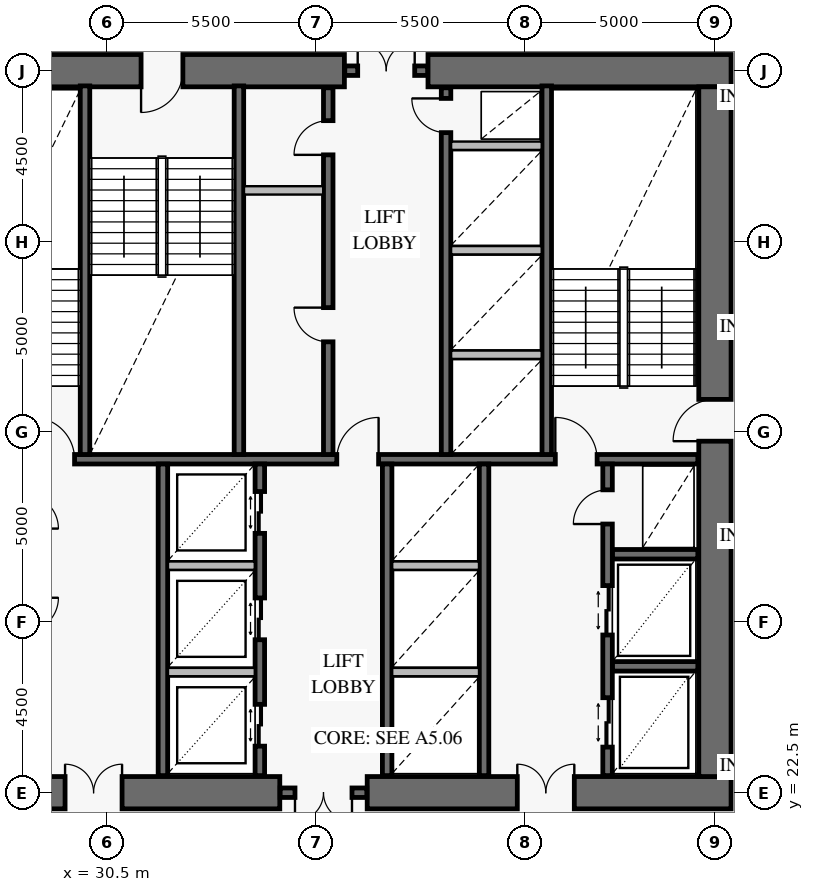
"""IFC4 building model, lengths in metres.
Left out: names, types, materials, properties, quantities, classifications, styles, units other than length and angle.
Written with IfcOpenShell. Run it as: python <this file> out.ifc"""

import sys

from ifc_helpers import new_model, si_unit, direction, frame, frame_2d, origin, place, context, subcontext, project, spatial, rectangle, extrude, element, fill, save


model = new_model("IFC4")
c1 = context("Model", 3, precision=1e-05, world=origin(), true_north=direction((0.0, 1.0)))
c2 = subcontext(c1, "Body", "Model", "MODEL_VIEW")
j1 = project(units=[si_unit("LENGTHUNIT", "METRE"), si_unit("PLANEANGLEUNIT", "RADIAN")], contexts=[c1])
p1 = place(None, origin())
s1 = spatial("IfcSite", under=j1, at=p1, CompositionType="ELEMENT")
p2 = place(p1, origin())
s2 = spatial("IfcBuilding", under=s1, at=p2, CompositionType="ELEMENT")
p3 = place(p2, frame((0.0, 0.0, 75.0)))
s3 = spatial("IfcBuildingStorey", under=s2, at=p3, CompositionType="ELEMENT", Elevation=75.0)
p4 = place(p3, frame((25.075, 22.5, 0.0), z_axis=(0.0, 0.0, 1.0), x_axis=(1.0, 0.0, 0.0)))
e1 = element("IfcWall", 1, at=p4, inside=s3, PredefinedType="SHEAR", context=c2, shape_type="SweptSolid", body=[
    extrude(rectangle(XDim=9.975, YDim=0.85, at=frame_2d((4.988, 0.0))), origin(), (0.0, 0.0, 1.0), 4.2),
])
p5 = place(p4, frame((4.325, 0.0, 0.0)))
e2 = element("IfcOpeningElement", 2, at=p5, cuts=e1, PredefinedType="OPENING", context=c2, shape_type="SweptSolid", body=[
    extrude(rectangle(XDim=1.5, YDim=2.15, at=frame_2d((0.75, 1.075))), frame((0.0, 0.437, 0.0), z_axis=(0.0, -1.0, 0.0), x_axis=(1.0, 0.0, 0.0)), (0.0, 0.0, 1.0), 0.874),
])
p6 = place(p3, frame((37.35, 22.5, 0.0), z_axis=(0.0, 0.0, 1.0), x_axis=(1.0, 0.0, 0.0)))
e3 = element("IfcWall", 3, at=p6, inside=s3, PredefinedType="SHEAR", context=c2, shape_type="SweptSolid", body=[
    extrude(rectangle(XDim=9.575, YDim=0.85, at=frame_2d((4.788, 0.0))), origin(), (0.0, 0.0, 1.0), 4.2),
])
p7 = place(p6, frame((3.95, 0.0, 0.0)))
e4 = element("IfcOpeningElement", 4, at=p7, cuts=e3, PredefinedType="OPENING", context=c2, shape_type="SweptSolid", body=[
    extrude(rectangle(XDim=1.5, YDim=2.15, at=frame_2d((0.75, 1.075))), frame((0.0, 0.437, 0.0), z_axis=(0.0, -1.0, 0.0), x_axis=(1.0, 0.0, 0.0)), (0.0, 0.0, 1.0), 0.874),
])
p8 = place(p3, frame((46.925, 41.5, 0.0), z_axis=(0.0, 0.0, 1.0), x_axis=(-1.0, 0.0, 0.0)))
e5 = element("IfcWall", 5, at=p8, inside=s3, PredefinedType="SHEAR", context=c2, shape_type="SweptSolid", body=[
    extrude(rectangle(XDim=7.975, YDim=0.85, at=frame_2d((3.988, 0.0))), origin(), (0.0, 0.0, 1.0), 4.2),
])
p9 = place(p3, frame((36.75, 41.5, 0.0), z_axis=(0.0, 0.0, 1.0), x_axis=(-1.0, 0.0, 0.0)))
e6 = element("IfcWall", 6, at=p9, inside=s3, PredefinedType="SHEAR", context=c2, shape_type="SweptSolid", body=[
    extrude(rectangle(XDim=11.675, YDim=0.85, at=frame_2d((5.837, 0.0))), origin(), (0.0, 0.0, 1.0), 4.2),
])
p10 = place(p9, frame((4.25, 0.0, 0.0)))
e7 = element("IfcOpeningElement", 7, at=p10, cuts=e6, PredefinedType="OPENING", context=c2, shape_type="SweptSolid", body=[
    extrude(rectangle(XDim=1.1, YDim=2.15, at=frame_2d((0.55, 1.075))), frame((0.0, 0.437, 0.0), z_axis=(0.0, -1.0, 0.0), x_axis=(1.0, 0.0, 0.0)), (0.0, 0.0, 1.0), 0.874),
])
p11 = place(p3, frame((46.5, 22.925, 0.0), z_axis=(0.0, 0.0, 1.0), x_axis=(0.0, 1.0, 0.0)))
e8 = element("IfcWall", 8, at=p11, inside=s3, PredefinedType="SHEAR", context=c2, shape_type="SweptSolid", body=[
    extrude(rectangle(XDim=18.15, YDim=0.85, at=frame_2d((9.075, 0.0))), origin(), (0.0, 0.0, 1.0), 4.2),
])
p12 = place(p11, frame((8.825, 0.0, 0.0)))
e9 = element("IfcOpeningElement", 9, at=p12, cuts=e8, PredefinedType="OPENING", context=c2, shape_type="SweptSolid", body=[
    extrude(rectangle(XDim=1.1, YDim=2.15, at=frame_2d((0.55, 1.075))), frame((0.0, 0.437, 0.0), z_axis=(0.0, -1.0, 0.0), x_axis=(1.0, 0.0, 0.0)), (0.0, 0.0, 1.0), 0.874),
])
p13 = place(p3, frame((35.06, 22.5, 0.0), z_axis=(0.0, 0.0, 1.0), x_axis=(1.0, 0.0, 0.0)))
e10 = element("IfcWall", 10, at=p13, inside=s3, PredefinedType="SOLIDWALL", context=c2, shape_type="SweptSolid", body=[
    extrude(rectangle(XDim=2.28, YDim=0.25, at=frame_2d((1.14, 0.0))), origin(), (0.0, 0.0, 1.0), 4.2),
])
p14 = place(p13, frame((0.39, 0.0, 0.0)))
e11 = element("IfcOpeningElement", 11, at=p14, cuts=e10, PredefinedType="OPENING", context=c2, shape_type="SweptSolid", body=[
    extrude(rectangle(XDim=1.5, YDim=2.15, at=frame_2d((0.75, 1.075))), frame((0.0, 0.137, 0.0), z_axis=(0.0, -1.0, 0.0), x_axis=(1.0, 0.0, 0.0)), (0.0, 0.0, 1.0), 0.274),
])
p15 = place(p3, frame((36.76, 41.5, 0.0), z_axis=(0.0, 0.0, 1.0), x_axis=(1.0, 0.0, 0.0)))
e12 = element("IfcWall", 12, at=p15, inside=s3, PredefinedType="SOLIDWALL", context=c2, shape_type="SweptSolid", body=[
    extrude(rectangle(XDim=2.18, YDim=0.25, at=frame_2d((1.09, 0.0))), origin(), (0.0, 0.0, 1.0), 4.2),
])
p16 = place(p15, frame((0.34, 0.0, 0.0)))
e13 = element("IfcOpeningElement", 13, at=p16, cuts=e12, PredefinedType="OPENING", context=c2, shape_type="SweptSolid", body=[
    extrude(rectangle(XDim=1.5, YDim=2.15, at=frame_2d((0.75, 1.075))), frame((0.0, 0.137, 0.0), z_axis=(0.0, -1.0, 0.0), x_axis=(1.0, 0.0, 0.0)), (0.0, 0.0, 1.0), 0.274),
])
p17 = place(p3, frame((25.95, 31.275, 0.0), z_axis=(0.0, 0.0, 1.0), x_axis=(1.0, 0.0, 0.0)))
e14 = element("IfcWall", 14, at=p17, inside=s3, PredefinedType="SOLIDWALL", context=c2, shape_type="SweptSolid", body=[
    extrude(rectangle(XDim=20.1, YDim=0.25, at=frame_2d((10.05, 0.0))), origin(), (0.0, 0.0, 1.0), 4.2),
])
p18 = place(p17, frame((2.6, 0.0, 0.0)))
e15 = element("IfcOpeningElement", 15, at=p18, cuts=e14, PredefinedType="OPENING", context=c2, shape_type="SweptSolid", body=[
    extrude(rectangle(XDim=1.1, YDim=2.15, at=frame_2d((0.55, 1.075))), frame((0.0, 0.137, 0.0), z_axis=(0.0, -1.0, 0.0), x_axis=(1.0, 0.0, 0.0)), (0.0, 0.0, 1.0), 0.274),
])
p19 = place(p17, frame((10.6, 0.0, 0.0)))
e16 = element("IfcOpeningElement", 16, at=p19, cuts=e14, PredefinedType="OPENING", context=c2, shape_type="SweptSolid", body=[
    extrude(rectangle(XDim=1.1, YDim=2.15, at=frame_2d((0.55, 1.075))), frame((0.0, 0.137, 0.0), z_axis=(0.0, -1.0, 0.0), x_axis=(1.0, 0.0, 0.0)), (0.0, 0.0, 1.0), 0.274),
])
p20 = place(p17, frame((16.35, 0.0, 0.0)))
e17 = element("IfcOpeningElement", 17, at=p20, cuts=e14, PredefinedType="OPENING", context=c2, shape_type="SweptSolid", body=[
    extrude(rectangle(XDim=1.1, YDim=2.15, at=frame_2d((0.55, 1.075))), frame((0.0, 0.137, 0.0), z_axis=(0.0, -1.0, 0.0), x_axis=(1.0, 0.0, 0.0)), (0.0, 0.0, 1.0), 0.274),
])
for number, where, z_axis, x_axis in (
    (18, (29.925, 31.4, 0.0), (0.0, 0.0, 1.0), (0.0, 1.0, 0.0)),
    (19, (33.975, 31.4, 0.0), (0.0, 0.0, 1.0), (0.0, 1.0, 0.0)),
    (20, (42.075, 31.4, 0.0), (0.0, 0.0, 1.0), (0.0, 1.0, 0.0)),
):
    element("IfcWall", number, at=place(p3, frame(where, z_axis=z_axis, x_axis=x_axis)), inside=s3, PredefinedType="SOLIDWALL", context=c2, shape_type="SweptSolid", body=[
        extrude(rectangle(XDim=9.7, YDim=0.25, at=frame_2d((4.85, 0.0))), origin(), (0.0, 0.0, 1.0), 4.2),
    ])
p21 = place(p3, frame((36.325, 31.4, 0.0), z_axis=(0.0, 0.0, 1.0), x_axis=(0.0, 1.0, 0.0)))
e21 = element("IfcWall", 21, at=p21, inside=s3, PredefinedType="SOLIDWALL", context=c2, shape_type="SweptSolid", body=[
    extrude(rectangle(XDim=9.65, YDim=0.25, at=frame_2d((4.825, 0.0))), origin(), (0.0, 0.0, 1.0), 4.2),
])
p22 = place(p21, frame((2.965, 0.0, 0.0)))
e22 = element("IfcOpeningElement", 22, at=p22, cuts=e21, PredefinedType="OPENING", context=c2, shape_type="SweptSolid", body=[
    extrude(rectangle(XDim=0.9, YDim=2.1, at=frame_2d((0.45, 1.05))), frame((0.0, 0.137, 0.0), z_axis=(0.0, -1.0, 0.0), x_axis=(1.0, 0.0, 0.0)), (0.0, 0.0, 1.0), 0.274),
])
p23 = place(p21, frame((7.885, 0.0, 0.0)))
e23 = element("IfcOpeningElement", 23, at=p23, cuts=e21, PredefinedType="OPENING", context=c2, shape_type="SweptSolid", body=[
    extrude(rectangle(XDim=0.9, YDim=2.1, at=frame_2d((0.45, 1.05))), frame((0.0, 0.137, 0.0), z_axis=(0.0, -1.0, 0.0), x_axis=(1.0, 0.0, 0.0)), (0.0, 0.0, 1.0), 0.274),
])
p24 = place(p3, frame((39.425, 31.4, 0.0), z_axis=(0.0, 0.0, 1.0), x_axis=(0.0, 1.0, 0.0)))
e24 = element("IfcWall", 24, at=p24, inside=s3, PredefinedType="SOLIDWALL", context=c2, shape_type="SweptSolid", body=[
    extrude(rectangle(XDim=9.65, YDim=0.25, at=frame_2d((4.825, 0.0))), origin(), (0.0, 0.0, 1.0), 4.2),
])
p25 = place(p24, frame((8.47, 0.0, 0.0)))
e25 = element("IfcOpeningElement", 25, at=p25, cuts=e24, PredefinedType="OPENING", context=c2, shape_type="SweptSolid", body=[
    extrude(rectangle(XDim=0.9, YDim=2.1, at=frame_2d((0.45, 1.05))), frame((0.0, 0.137, 0.0), z_axis=(0.0, -1.0, 0.0), x_axis=(1.0, 0.0, 0.0)), (0.0, 0.0, 1.0), 0.274),
])
p26 = place(p3, frame((31.975, 22.95, 0.0), z_axis=(0.0, 0.0, 1.0), x_axis=(0.0, 1.0, 0.0)))
e26 = element("IfcWall", 26, at=p26, inside=s3, PredefinedType="SOLIDWALL", context=c2, shape_type="SweptSolid", body=[
    extrude(rectangle(XDim=8.2, YDim=0.25, at=frame_2d((4.1, 0.0))), origin(), (0.0, 0.0, 1.0), 4.2),
])
p27 = place(p3, frame((34.525, 22.95, 0.0), z_axis=(0.0, 0.0, 1.0), x_axis=(0.0, 1.0, 0.0)))
e27 = element("IfcWall", 27, at=p27, inside=s3, PredefinedType="SOLIDWALL", context=c2, shape_type="SweptSolid", body=[
    extrude(rectangle(XDim=8.2, YDim=0.25, at=frame_2d((4.1, 0.0))), origin(), (0.0, 0.0, 1.0), 4.2),
])
p28 = place(p27, frame((0.775, 0.0, 0.0)))
e28 = element("IfcOpeningElement", 28, at=p28, cuts=e27, PredefinedType="OPENING", context=c2, shape_type="SweptSolid", body=[
    extrude(rectangle(XDim=1.1, YDim=2.2, at=frame_2d((0.55, 1.1))), frame((0.0, 0.137, 0.0), z_axis=(0.0, -1.0, 0.0), x_axis=(1.0, 0.0, 0.0)), (0.0, 0.0, 1.0), 0.274),
])
p29 = place(p27, frame((3.575, 0.0, 0.0)))
e29 = element("IfcOpeningElement", 29, at=p29, cuts=e27, PredefinedType="OPENING", context=c2, shape_type="SweptSolid", body=[
    extrude(rectangle(XDim=1.1, YDim=2.2, at=frame_2d((0.55, 1.1))), frame((0.0, 0.137, 0.0), z_axis=(0.0, -1.0, 0.0), x_axis=(1.0, 0.0, 0.0)), (0.0, 0.0, 1.0), 0.274),
])
p30 = place(p27, frame((6.375, 0.0, 0.0)))
e30 = element("IfcOpeningElement", 30, at=p30, cuts=e27, PredefinedType="OPENING", context=c2, shape_type="SweptSolid", body=[
    extrude(rectangle(XDim=1.1, YDim=2.2, at=frame_2d((0.55, 1.1))), frame((0.0, 0.137, 0.0), z_axis=(0.0, -1.0, 0.0), x_axis=(1.0, 0.0, 0.0)), (0.0, 0.0, 1.0), 0.274),
])
for number, where, z_axis, x_axis in (
    (31, (37.875, 22.95, 0.0), (0.0, 0.0, 1.0), (0.0, 1.0, 0.0)),
    (32, (40.425, 22.95, 0.0), (0.0, 0.0, 1.0), (0.0, 1.0, 0.0)),
):
    element("IfcWall", number, at=place(p3, frame(where, z_axis=z_axis, x_axis=x_axis)), inside=s3, PredefinedType="SOLIDWALL", context=c2, shape_type="SweptSolid", body=[
        extrude(rectangle(XDim=8.2, YDim=0.25, at=frame_2d((4.1, 0.0))), origin(), (0.0, 0.0, 1.0), 4.2),
    ])
for number, where, z_axis, x_axis in (
    (33, (43.8, 25.825, 0.0), (0.0, 0.0, 1.0), (1.0, 0.0, 0.0)),
    (34, (43.8, 28.775, 0.0), (0.0, 0.0, 1.0), (1.0, 0.0, 0.0)),
):
    element("IfcWall", number, at=place(p3, frame(where, z_axis=z_axis, x_axis=x_axis)), inside=s3, PredefinedType="SOLIDWALL", context=c2, shape_type="SweptSolid", body=[
        extrude(rectangle(XDim=2.25, YDim=0.25, at=frame_2d((1.125, 0.0))), origin(), (0.0, 0.0, 1.0), 4.2),
    ])
p31 = place(p3, frame((43.675, 22.95, 0.0), z_axis=(0.0, 0.0, 1.0), x_axis=(0.0, 1.0, 0.0)))
e35 = element("IfcWall", 35, at=p31, inside=s3, PredefinedType="SOLIDWALL", context=c2, shape_type="SweptSolid", body=[
    extrude(rectangle(XDim=8.2, YDim=0.25, at=frame_2d((4.1, 0.0))), origin(), (0.0, 0.0, 1.0), 4.2),
])
p32 = place(p31, frame((0.75, 0.0, 0.0)))
e36 = element("IfcOpeningElement", 36, at=p32, cuts=e35, PredefinedType="OPENING", context=c2, shape_type="SweptSolid", body=[
    extrude(rectangle(XDim=1.3, YDim=2.3, at=frame_2d((0.65, 1.15))), frame((0.0, 0.137, 0.0), z_axis=(0.0, -1.0, 0.0), x_axis=(1.0, 0.0, 0.0)), (0.0, 0.0, 1.0), 0.274),
])
p33 = place(p31, frame((3.7, 0.0, 0.0)))
e37 = element("IfcOpeningElement", 37, at=p33, cuts=e35, PredefinedType="OPENING", context=c2, shape_type="SweptSolid", body=[
    extrude(rectangle(XDim=1.3, YDim=2.3, at=frame_2d((0.65, 1.15))), frame((0.0, 0.137, 0.0), z_axis=(0.0, -1.0, 0.0), x_axis=(1.0, 0.0, 0.0)), (0.0, 0.0, 1.0), 0.274),
])
p34 = place(p31, frame((6.62, 0.0, 0.0)))
e38 = element("IfcOpeningElement", 38, at=p34, cuts=e35, PredefinedType="OPENING", context=c2, shape_type="SweptSolid", body=[
    extrude(rectangle(XDim=0.9, YDim=2.1, at=frame_2d((0.45, 1.05))), frame((0.0, 0.137, 0.0), z_axis=(0.0, -1.0, 0.0), x_axis=(1.0, 0.0, 0.0)), (0.0, 0.0, 1.0), 0.274),
])
p35 = place(p3, frame((34.108, 38.35, 0.0), z_axis=(0.0, 0.0, 1.0), x_axis=(1.0, 0.0, 0.0)))
e39 = element("IfcWall", 39, at=p35, inside=s3, PredefinedType="PARTITIONING", context=c2, shape_type="SweptSolid", body=[
    extrude(rectangle(XDim=2.084, YDim=0.22, at=frame_2d((1.042, 0.0))), origin(), (0.0, 0.0, 1.0), 3.92),
])
for number, where, z_axis, x_axis in (
    (40, (39.558, 34.025, 0.0), (0.0, 0.0, 1.0), (1.0, 0.0, 0.0)),
    (41, (39.558, 36.775, 0.0), (0.0, 0.0, 1.0), (1.0, 0.0, 0.0)),
    (42, (39.558, 39.525, 0.0), (0.0, 0.0, 1.0), (1.0, 0.0, 0.0)),
):
    element("IfcWall", number, at=place(p3, frame(where, z_axis=z_axis, x_axis=x_axis)), inside=s3, PredefinedType="PARTITIONING", context=c2, shape_type="SweptSolid", body=[
        extrude(rectangle(XDim=2.384, YDim=0.22, at=frame_2d((1.192, 0.0))), origin(), (0.0, 0.0, 1.0), 3.92),
    ])
for number, where, z_axis, x_axis in (
    (43, (32.108, 25.675, 0.0), (0.0, 0.0, 1.0), (1.0, 0.0, 0.0)),
    (44, (32.108, 28.475, 0.0), (0.0, 0.0, 1.0), (1.0, 0.0, 0.0)),
):
    element("IfcWall", number, at=place(p3, frame(where, z_axis=z_axis, x_axis=x_axis)), inside=s3, PredefinedType="PARTITIONING", context=c2, shape_type="SweptSolid", body=[
        extrude(rectangle(XDim=2.284, YDim=0.22, at=frame_2d((1.142, 0.0))), origin(), (0.0, 0.0, 1.0), 3.92),
    ])
for number, where, z_axis, x_axis in (
    (45, (38.008, 25.675, 0.0), (0.0, 0.0, 1.0), (1.0, 0.0, 0.0)),
    (46, (38.008, 28.475, 0.0), (0.0, 0.0, 1.0), (1.0, 0.0, 0.0)),
):
    element("IfcWall", number, at=place(p3, frame(where, z_axis=z_axis, x_axis=x_axis)), inside=s3, PredefinedType="PARTITIONING", context=c2, shape_type="SweptSolid", body=[
        extrude(rectangle(XDim=2.284, YDim=0.22, at=frame_2d((1.142, 0.0))), origin(), (0.0, 0.0, 1.0), 3.92),
    ])
p36 = place(p12, origin())
e47 = element("IfcDoor", 47, at=p36, inside=s3, OperationType="SINGLE_SWING_LEFT", PredefinedType="USERDEFINED", context=c2, shape_type="SweptSolid", body=[
    extrude(rectangle(XDim=1.1, YDim=2.15, at=frame_2d((0.55, 1.075))), frame((0.0, 0.025, 0.0), z_axis=(0.0, -1.0, 0.0), x_axis=(1.0, 0.0, 0.0)), (0.0, 0.0, 1.0), 0.05),
])
fill(e9, e47)
p37 = place(p10, origin())
e48 = element("IfcDoor", 48, at=p37, inside=s3, OperationType="SINGLE_SWING_RIGHT", PredefinedType="USERDEFINED", context=c2, shape_type="SweptSolid", body=[
    extrude(rectangle(XDim=1.1, YDim=2.15, at=frame_2d((0.55, 1.075))), frame((0.0, 0.025, 0.0), z_axis=(0.0, -1.0, 0.0), x_axis=(1.0, 0.0, 0.0)), (0.0, 0.0, 1.0), 0.05),
])
fill(e7, e48)
p38 = place(p5, origin())
e49 = element("IfcDoor", 49, at=p38, inside=s3, OperationType="DOUBLE_DOOR_SINGLE_SWING", PredefinedType="DOOR", context=c2, shape_type="SweptSolid", body=[
    extrude(rectangle(XDim=1.5, YDim=2.15, at=frame_2d((0.75, 1.075))), frame((0.0, 0.025, 0.0), z_axis=(0.0, -1.0, 0.0), x_axis=(1.0, 0.0, 0.0)), (0.0, 0.0, 1.0), 0.05),
])
fill(e2, e49)
p39 = place(p7, origin())
e50 = element("IfcDoor", 50, at=p39, inside=s3, OperationType="DOUBLE_DOOR_SINGLE_SWING", PredefinedType="DOOR", context=c2, shape_type="SweptSolid", body=[
    extrude(rectangle(XDim=1.5, YDim=2.15, at=frame_2d((0.75, 1.075))), frame((0.0, 0.025, 0.0), z_axis=(0.0, -1.0, 0.0), x_axis=(1.0, 0.0, 0.0)), (0.0, 0.0, 1.0), 0.05),
])
fill(e4, e50)
p40 = place(p14, frame((1.5, 0.0, 0.0), z_axis=(0.0, 0.0, 1.0), x_axis=(-1.0, 0.0, 0.0)))
e51 = element("IfcDoor", 51, at=p40, inside=s3, OperationType="DOUBLE_DOOR_SINGLE_SWING", PredefinedType="DOOR", context=c2, shape_type="SweptSolid", body=[
    extrude(rectangle(XDim=1.5, YDim=2.15, at=frame_2d((0.75, 1.075))), frame((0.0, 0.025, 0.0), z_axis=(0.0, -1.0, 0.0), x_axis=(1.0, 0.0, 0.0)), (0.0, 0.0, 1.0), 0.05),
])
fill(e11, e51)
p41 = place(p16, origin())
e52 = element("IfcDoor", 52, at=p41, inside=s3, OperationType="DOUBLE_DOOR_SINGLE_SWING", PredefinedType="DOOR", context=c2, shape_type="SweptSolid", body=[
    extrude(rectangle(XDim=1.5, YDim=2.15, at=frame_2d((0.75, 1.075))), frame((0.0, 0.025, 0.0), z_axis=(0.0, -1.0, 0.0), x_axis=(1.0, 0.0, 0.0)), (0.0, 0.0, 1.0), 0.05),
])
fill(e13, e52)
p42 = place(p18, origin())
e53 = element("IfcDoor", 53, at=p42, inside=s3, OperationType="SINGLE_SWING_LEFT", PredefinedType="USERDEFINED", context=c2, shape_type="SweptSolid", body=[
    extrude(rectangle(XDim=1.1, YDim=2.15, at=frame_2d((0.55, 1.075))), frame((0.0, 0.025, 0.0), z_axis=(0.0, -1.0, 0.0), x_axis=(1.0, 0.0, 0.0)), (0.0, 0.0, 1.0), 0.05),
])
fill(e15, e53)
p43 = place(p19, origin())
e54 = element("IfcDoor", 54, at=p43, inside=s3, OperationType="SINGLE_SWING_RIGHT", PredefinedType="USERDEFINED", context=c2, shape_type="SweptSolid", body=[
    extrude(rectangle(XDim=1.1, YDim=2.15, at=frame_2d((0.55, 1.075))), frame((0.0, 0.025, 0.0), z_axis=(0.0, -1.0, 0.0), x_axis=(1.0, 0.0, 0.0)), (0.0, 0.0, 1.0), 0.05),
])
fill(e16, e54)
p44 = place(p20, origin())
e55 = element("IfcDoor", 55, at=p44, inside=s3, OperationType="SINGLE_SWING_LEFT", PredefinedType="USERDEFINED", context=c2, shape_type="SweptSolid", body=[
    extrude(rectangle(XDim=1.1, YDim=2.15, at=frame_2d((0.55, 1.075))), frame((0.0, 0.025, 0.0), z_axis=(0.0, -1.0, 0.0), x_axis=(1.0, 0.0, 0.0)), (0.0, 0.0, 1.0), 0.05),
])
fill(e17, e55)
p45 = place(p22, origin())
e56 = element("IfcDoor", 56, at=p45, inside=s3, OperationType="SINGLE_SWING_RIGHT", PredefinedType="DOOR", context=c2, shape_type="SweptSolid", body=[
    extrude(rectangle(XDim=0.9, YDim=2.1, at=frame_2d((0.45, 1.05))), frame((0.0, 0.025, 0.0), z_axis=(0.0, -1.0, 0.0), x_axis=(1.0, 0.0, 0.0)), (0.0, 0.0, 1.0), 0.05),
])
fill(e22, e56)
p46 = place(p23, origin())
e57 = element("IfcDoor", 57, at=p46, inside=s3, OperationType="SINGLE_SWING_LEFT", PredefinedType="DOOR", context=c2, shape_type="SweptSolid", body=[
    extrude(rectangle(XDim=0.9, YDim=2.1, at=frame_2d((0.45, 1.05))), frame((0.0, 0.025, 0.0), z_axis=(0.0, -1.0, 0.0), x_axis=(1.0, 0.0, 0.0)), (0.0, 0.0, 1.0), 0.05),
])
fill(e23, e57)
p47 = place(p25, origin())
e58 = element("IfcDoor", 58, at=p47, inside=s3, OperationType="SINGLE_SWING_RIGHT", PredefinedType="DOOR", context=c2, shape_type="SweptSolid", body=[
    extrude(rectangle(XDim=0.9, YDim=2.1, at=frame_2d((0.45, 1.05))), frame((0.0, 0.025, 0.0), z_axis=(0.0, -1.0, 0.0), x_axis=(1.0, 0.0, 0.0)), (0.0, 0.0, 1.0), 0.05),
])
fill(e25, e58)
p48 = place(p28, frame((1.1, 0.0, 0.0), z_axis=(0.0, 0.0, 1.0), x_axis=(-1.0, 0.0, 0.0)))
e59 = element("IfcDoor", 59, at=p48, inside=s3, OperationType="DOUBLE_DOOR_SLIDING", PredefinedType="DOOR", context=c2, shape_type="SweptSolid", body=[
    extrude(rectangle(XDim=1.1, YDim=2.2, at=frame_2d((0.55, 1.1))), frame((0.0, 0.025, 0.0), z_axis=(0.0, -1.0, 0.0), x_axis=(1.0, 0.0, 0.0)), (0.0, 0.0, 1.0), 0.05),
])
fill(e28, e59)
p49 = place(p29, frame((1.1, 0.0, 0.0), z_axis=(0.0, 0.0, 1.0), x_axis=(-1.0, 0.0, 0.0)))
e60 = element("IfcDoor", 60, at=p49, inside=s3, OperationType="DOUBLE_DOOR_SLIDING", PredefinedType="DOOR", context=c2, shape_type="SweptSolid", body=[
    extrude(rectangle(XDim=1.1, YDim=2.2, at=frame_2d((0.55, 1.1))), frame((0.0, 0.025, 0.0), z_axis=(0.0, -1.0, 0.0), x_axis=(1.0, 0.0, 0.0)), (0.0, 0.0, 1.0), 0.05),
])
fill(e29, e60)
p50 = place(p30, frame((1.1, 0.0, 0.0), z_axis=(0.0, 0.0, 1.0), x_axis=(-1.0, 0.0, 0.0)))
e61 = element("IfcDoor", 61, at=p50, inside=s3, OperationType="DOUBLE_DOOR_SLIDING", PredefinedType="DOOR", context=c2, shape_type="SweptSolid", body=[
    extrude(rectangle(XDim=1.1, YDim=2.2, at=frame_2d((0.55, 1.1))), frame((0.0, 0.025, 0.0), z_axis=(0.0, -1.0, 0.0), x_axis=(1.0, 0.0, 0.0)), (0.0, 0.0, 1.0), 0.05),
])
fill(e30, e61)
p51 = place(p32, origin())
e62 = element("IfcDoor", 62, at=p51, inside=s3, OperationType="DOUBLE_DOOR_SLIDING", PredefinedType="DOOR", context=c2, shape_type="SweptSolid", body=[
    extrude(rectangle(XDim=1.3, YDim=2.3, at=frame_2d((0.65, 1.15))), frame((0.0, 0.025, 0.0), z_axis=(0.0, -1.0, 0.0), x_axis=(1.0, 0.0, 0.0)), (0.0, 0.0, 1.0), 0.05),
])
fill(e36, e62)
p52 = place(p33, origin())
e63 = element("IfcDoor", 63, at=p52, inside=s3, OperationType="DOUBLE_DOOR_SLIDING", PredefinedType="DOOR", context=c2, shape_type="SweptSolid", body=[
    extrude(rectangle(XDim=1.3, YDim=2.3, at=frame_2d((0.65, 1.15))), frame((0.0, 0.025, 0.0), z_axis=(0.0, -1.0, 0.0), x_axis=(1.0, 0.0, 0.0)), (0.0, 0.0, 1.0), 0.05),
])
fill(e37, e63)
p53 = place(p34, origin())
e64 = element("IfcDoor", 64, at=p53, inside=s3, OperationType="SINGLE_SWING_LEFT", PredefinedType="DOOR", context=c2, shape_type="SweptSolid", body=[
    extrude(rectangle(XDim=0.9, YDim=2.1, at=frame_2d((0.45, 1.05))), frame((0.0, 0.025, 0.0), z_axis=(0.0, -1.0, 0.0), x_axis=(1.0, 0.0, 0.0)), (0.0, 0.0, 1.0), 0.05),
])
fill(e38, e64)
save(model, sys.argv[1])
